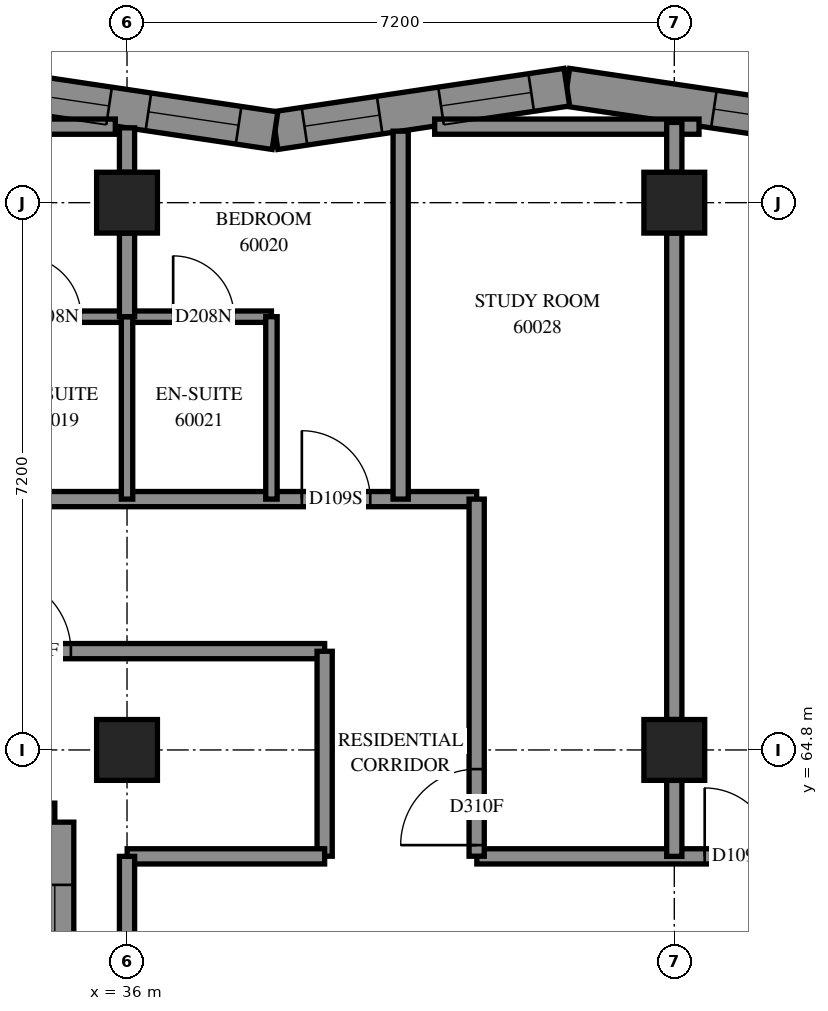
"""IFC4 building model, lengths in metres.
Left out: names, types, materials, properties, quantities, classifications, styles, units other than length and angle.
Written with IfcOpenShell. Run it as: python <this file> out.ifc"""

import sys

from ifc_helpers import new_model, si_unit, direction, frame, frame_2d, origin, origin_2d, place, context, subcontext, project, spatial, polyline, rectangle, outline, extrude, element, fill, save


model = new_model("IFC4")
c1 = context("Model", 3, precision=1e-05, world=origin(), true_north=direction((0.0, 1.0)))
c2 = subcontext(c1, "Body", "Model", "MODEL_VIEW")
j1 = project(units=[si_unit("LENGTHUNIT", "METRE"), si_unit("PLANEANGLEUNIT", "RADIAN")], contexts=[c1])
p1 = place(None, origin())
s1 = spatial("IfcSite", under=j1, at=p1, CompositionType="ELEMENT")
p2 = place(p1, origin())
s2 = spatial("IfcBuilding", under=s1, at=p2, CompositionType="ELEMENT")
p3 = place(p2, frame((0.0, 0.0, 220.2)))
s3 = spatial("IfcBuildingStorey", under=s2, at=p3, CompositionType="ELEMENT", Elevation=220.2)
for number, where, z_axis, x_axis in (
    (1, (36.0, 64.8, 0.0), (0.0, 0.0, 1.0), (1.0, 0.0, 0.0)),
    (2, (36.0, 72.0, 0.0), (0.0, 0.0, 1.0), (1.0, 0.0, 0.0)),
    (3, (43.2, 64.8, 0.0), (0.0, 0.0, 1.0), (1.0, 0.0, 0.0)),
    (4, (43.2, 72.0, 0.0), (0.0, 0.0, 1.0), (1.0, 0.0, 0.0)),
):
    element("IfcColumn", number, at=place(p3, frame(where, z_axis=z_axis, x_axis=x_axis)), inside=s3, PredefinedType="COLUMN", context=c2, shape_type="SweptSolid", body=[
        extrude(rectangle(XDim=0.8, YDim=0.8, at=origin_2d()), origin(), (0.0, 0.0, 1.0), 3.1),
    ])
p4 = place(p3, frame((45.626, 72.947, 0.0), z_axis=(0.0, 0.0, 1.0), x_axis=(-0.9890853061, 0.14734401, 0.0)))
e5 = element("IfcWall", 5, at=p4, inside=s3, PredefinedType="SOLIDWALL", context=c2, shape_type="SweptSolid", body=[
    extrude(outline(polyline([(0.037, -0.25), (3.919, -0.25), (3.845, 0.25), (-0.037, 0.25), (0.037, -0.25)])), origin(), (0.0, 0.0, 1.0), 3.1),
])
p5 = place(p4, frame((0.726, 0.0, 0.45)))
e6 = element("IfcOpeningElement", 6, at=p5, cuts=e5, PredefinedType="OPENING", context=c2, shape_type="SweptSolid", body=[
    extrude(rectangle(XDim=1.2, YDim=2.5, at=frame_2d((0.6, 1.25))), frame((0.0, 0.26, 0.0), z_axis=(0.0, -1.0, 0.0), x_axis=(1.0, 0.0, 0.0)), (0.0, 0.0, 1.0), 0.52),
])
p6 = place(p3, frame((41.786, 73.519, 0.0), z_axis=(0.0, 0.0, 1.0), x_axis=(-0.9890847468, -0.1473477641, 0.0)))
e7 = element("IfcWall", 7, at=p6, inside=s3, PredefinedType="SOLIDWALL", context=c2, shape_type="SweptSolid", body=[
    extrude(outline(polyline([(-0.037, -0.25), (3.845, -0.25), (3.919, 0.25), (0.037, 0.25), (-0.037, -0.25)])), origin(), (0.0, 0.0, 1.0), 3.1),
])
p7 = place(p6, frame((0.474, 0.0, 0.45)))
e8 = element("IfcOpeningElement", 8, at=p7, cuts=e7, PredefinedType="OPENING", context=c2, shape_type="SweptSolid", body=[
    extrude(rectangle(XDim=1.2, YDim=2.5, at=frame_2d((0.6, 1.25))), frame((0.0, 0.26, 0.0), z_axis=(0.0, -1.0, 0.0), x_axis=(1.0, 0.0, 0.0)), (0.0, 0.0, 1.0), 0.52),
])
p8 = place(p6, frame((2.49, 0.0, 0.45)))
e9 = element("IfcOpeningElement", 9, at=p8, cuts=e7, PredefinedType="OPENING", context=c2, shape_type="SweptSolid", body=[
    extrude(rectangle(XDim=1.0, YDim=2.5, at=frame_2d((0.5, 1.25))), frame((0.0, 0.26, 0.0), z_axis=(0.0, -1.0, 0.0), x_axis=(1.0, 0.0, 0.0)), (0.0, 0.0, 1.0), 0.52),
])
p9 = place(p3, frame((37.947, 72.947, 0.0), z_axis=(0.0, 0.0, 1.0), x_axis=(-0.9890847468, 0.1473477641, 0.0)))
e10 = element("IfcWall", 10, at=p9, inside=s3, PredefinedType="SOLIDWALL", context=c2, shape_type="SweptSolid", body=[
    extrude(outline(polyline([(0.037, -0.25), (3.919, -0.25), (3.845, 0.25), (-0.037, 0.25), (0.037, -0.25)])), origin(), (0.0, 0.0, 1.0), 3.1),
])
p10 = place(p9, frame((0.484, 0.0, 0.45)))
e11 = element("IfcOpeningElement", 11, at=p10, cuts=e10, PredefinedType="OPENING", context=c2, shape_type="SweptSolid", body=[
    extrude(rectangle(XDim=1.2, YDim=2.5, at=frame_2d((0.6, 1.25))), frame((0.0, 0.26, 0.0), z_axis=(0.0, -1.0, 0.0), x_axis=(1.0, 0.0, 0.0)), (0.0, 0.0, 1.0), 0.52),
])
p11 = place(p9, frame((2.207, 0.0, 0.45)))
e12 = element("IfcOpeningElement", 12, at=p11, cuts=e10, PredefinedType="OPENING", context=c2, shape_type="SweptSolid", body=[
    extrude(rectangle(XDim=1.2, YDim=2.5, at=frame_2d((0.6, 1.25))), frame((0.0, 0.26, 0.0), z_axis=(0.0, -1.0, 0.0), x_axis=(1.0, 0.0, 0.0)), (0.0, 0.0, 1.0), 0.52),
])
p12 = place(p3, frame((26.678, 63.85, 0.0), z_axis=(0.0, 0.0, 1.0), x_axis=(1.0, 0.0, 0.0)))
e13 = element("IfcWall", 13, at=p12, inside=s3, PredefinedType="SOLIDWALL", context=c2, shape_type="SweptSolid", body=[
    extrude(outline(polyline([(-0.25, -0.25), (8.122, -0.25), (8.622, 0.25), (0.25, 0.25), (-0.25, -0.25)])), origin(), (0.0, 0.0, 1.0), 3.1),
])
p13 = place(p12, frame((2.272, 0.0, 0.45)))
e14 = element("IfcOpeningElement", 14, at=p13, cuts=e13, PredefinedType="OPENING", context=c2, shape_type="SweptSolid", body=[
    extrude(rectangle(XDim=1.3, YDim=2.5, at=frame_2d((0.65, 1.25))), frame((0.0, 0.26, 0.0), z_axis=(0.0, -1.0, 0.0), x_axis=(1.0, 0.0, 0.0)), (0.0, 0.0, 1.0), 0.52),
])
p14 = place(p12, frame((3.772, 0.0, 0.45)))
e15 = element("IfcOpeningElement", 15, at=p14, cuts=e13, PredefinedType="OPENING", context=c2, shape_type="SweptSolid", body=[
    extrude(rectangle(XDim=1.3, YDim=2.5, at=frame_2d((0.65, 1.25))), frame((0.0, 0.26, 0.0), z_axis=(0.0, -1.0, 0.0), x_axis=(1.0, 0.0, 0.0)), (0.0, 0.0, 1.0), 0.52),
])
p15 = place(p12, frame((0.686, 0.0, 0.45)))
e16 = element("IfcOpeningElement", 16, at=p15, cuts=e13, PredefinedType="OPENING", context=c2, shape_type="SweptSolid", body=[
    extrude(rectangle(XDim=1.2, YDim=2.5, at=frame_2d((0.6, 1.25))), frame((0.0, 0.26, 0.0), z_axis=(0.0, -1.0, 0.0), x_axis=(1.0, 0.0, 0.0)), (0.0, 0.0, 1.0), 0.52),
])
p16 = place(p12, frame((6.347, 0.0, 0.45)))
e17 = element("IfcOpeningElement", 17, at=p16, cuts=e13, PredefinedType="OPENING", context=c2, shape_type="SweptSolid", body=[
    extrude(rectangle(XDim=1.2, YDim=2.5, at=frame_2d((0.6, 1.25))), frame((0.0, 0.26, 0.0), z_axis=(0.0, -1.0, 0.0), x_axis=(1.0, 0.0, 0.0)), (0.0, 0.0, 1.0), 0.52),
])
p17 = place(p3, frame((35.05, 63.85, 0.0), z_axis=(0.0, 0.0, 1.0), x_axis=(0.0, -1.0, 0.0)))
e18 = element("IfcWall", 18, at=p17, inside=s3, PredefinedType="SOLIDWALL", context=c2, shape_type="SweptSolid", body=[
    extrude(outline(polyline([(0.25, -0.25), (7.45, -0.25), (6.95, 0.25), (-0.25, 0.25), (0.25, -0.25)])), origin(), (0.0, 0.0, 1.0), 3.1),
])
p18 = place(p17, frame((3.05, 0.0, 0.45)))
e19 = element("IfcOpeningElement", 19, at=p18, cuts=e18, PredefinedType="OPENING", context=c2, shape_type="SweptSolid", body=[
    extrude(rectangle(XDim=1.3, YDim=2.5, at=frame_2d((0.65, 1.25))), frame((0.0, 0.26, 0.0), z_axis=(0.0, -1.0, 0.0), x_axis=(1.0, 0.0, 0.0)), (0.0, 0.0, 1.0), 0.52),
])
p19 = place(p17, frame((5.0, 0.0, 0.45)))
e20 = element("IfcOpeningElement", 20, at=p19, cuts=e18, PredefinedType="OPENING", context=c2, shape_type="SweptSolid", body=[
    extrude(rectangle(XDim=1.3, YDim=2.5, at=frame_2d((0.65, 1.25))), frame((0.0, 0.26, 0.0), z_axis=(0.0, -1.0, 0.0), x_axis=(1.0, 0.0, 0.0)), (0.0, 0.0, 1.0), 0.52),
])
p20 = place(p17, frame((0.825, 0.0, 0.45)))
e21 = element("IfcOpeningElement", 21, at=p20, cuts=e18, PredefinedType="OPENING", context=c2, shape_type="SweptSolid", body=[
    extrude(rectangle(XDim=1.2, YDim=2.5, at=frame_2d((0.6, 1.25))), frame((0.0, 0.26, 0.0), z_axis=(0.0, -1.0, 0.0), x_axis=(1.0, 0.0, 0.0)), (0.0, 0.0, 1.0), 0.52),
])
p21 = place(p3, frame((40.602, 63.4, 0.0), z_axis=(0.0, 0.0, 1.0), x_axis=(1.0, 0.0, 0.0)))
e22 = element("IfcWall", 22, at=p21, inside=s3, PredefinedType="PARTITIONING", context=c2, shape_type="SweptSolid", body=[
    extrude(rectangle(XDim=14.398, YDim=0.2, at=frame_2d((7.199, 0.0))), origin(), (0.0, 0.0, 1.0), 3.1),
])
p22 = place(p21, frame((2.998, 0.0, 0.0)))
e23 = element("IfcOpeningElement", 23, at=p22, cuts=e22, PredefinedType="OPENING", context=c2, shape_type="SweptSolid", body=[
    extrude(rectangle(XDim=0.9, YDim=2.1, at=frame_2d((0.45, 1.05))), frame((0.0, 0.11, 0.0), z_axis=(0.0, -1.0, 0.0), x_axis=(1.0, 0.0, 0.0)), (0.0, 0.0, 1.0), 0.22),
])
p23 = place(p21, frame((8.498, 0.0, 0.0)))
e24 = element("IfcOpeningElement", 24, at=p23, cuts=e22, PredefinedType="OPENING", context=c2, shape_type="SweptSolid", body=[
    extrude(rectangle(XDim=0.9, YDim=2.1, at=frame_2d((0.45, 1.05))), frame((0.0, 0.11, 0.0), z_axis=(0.0, -1.0, 0.0), x_axis=(1.0, 0.0, 0.0)), (0.0, 0.0, 1.0), 0.22),
])
p24 = place(p21, frame((10.198, 0.0, 0.0)))
e25 = element("IfcOpeningElement", 25, at=p24, cuts=e22, PredefinedType="OPENING", context=c2, shape_type="SweptSolid", body=[
    extrude(rectangle(XDim=0.9, YDim=2.1, at=frame_2d((0.45, 1.05))), frame((0.0, 0.11, 0.0), z_axis=(0.0, -1.0, 0.0), x_axis=(1.0, 0.0, 0.0)), (0.0, 0.0, 1.0), 0.22),
])
p25 = place(p3, frame((28.8, 68.1, 0.0), z_axis=(0.0, 0.0, 1.0), x_axis=(1.0, 0.0, 0.0)))
e26 = element("IfcWall", 26, at=p25, inside=s3, PredefinedType="PARTITIONING", context=c2, shape_type="SweptSolid", body=[
    extrude(rectangle(XDim=11.8, YDim=0.2, at=frame_2d((5.9, 0.0))), origin(), (0.0, 0.0, 1.0), 3.1),
])
p26 = place(p25, frame((2.3, 0.0, 0.0)))
e27 = element("IfcOpeningElement", 27, at=p26, cuts=e26, PredefinedType="OPENING", context=c2, shape_type="SweptSolid", body=[
    extrude(rectangle(XDim=0.9, YDim=2.1, at=frame_2d((0.45, 1.05))), frame((0.0, 0.11, 0.0), z_axis=(0.0, -1.0, 0.0), x_axis=(1.0, 0.0, 0.0)), (0.0, 0.0, 1.0), 0.22),
])
p27 = place(p25, frame((4.0, 0.0, 0.0)))
e28 = element("IfcOpeningElement", 28, at=p27, cuts=e26, PredefinedType="OPENING", context=c2, shape_type="SweptSolid", body=[
    extrude(rectangle(XDim=0.9, YDim=2.1, at=frame_2d((0.45, 1.05))), frame((0.0, 0.11, 0.0), z_axis=(0.0, -1.0, 0.0), x_axis=(1.0, 0.0, 0.0)), (0.0, 0.0, 1.0), 0.22),
])
p28 = place(p25, frame((9.5, 0.0, 0.0)))
e29 = element("IfcOpeningElement", 29, at=p28, cuts=e26, PredefinedType="OPENING", context=c2, shape_type="SweptSolid", body=[
    extrude(rectangle(XDim=0.9, YDim=2.1, at=frame_2d((0.45, 1.05))), frame((0.0, 0.11, 0.0), z_axis=(0.0, -1.0, 0.0), x_axis=(1.0, 0.0, 0.0)), (0.0, 0.0, 1.0), 0.22),
])
p29 = place(p3, frame((28.802, 66.1, 0.0), z_axis=(0.0, 0.0, 1.0), x_axis=(1.0, 0.0, 0.0)))
e30 = element("IfcWall", 30, at=p29, inside=s3, PredefinedType="PARTITIONING", context=c2, shape_type="SweptSolid", body=[
    extrude(rectangle(XDim=9.798, YDim=0.2, at=frame_2d((4.899, 0.0))), origin(), (0.0, 0.0, 1.0), 3.1),
])
p30 = place(p29, frame((0.449, 0.0, 0.0)))
e31 = element("IfcOpeningElement", 31, at=p30, cuts=e30, PredefinedType="OPENING", context=c2, shape_type="SweptSolid", body=[
    extrude(rectangle(XDim=1.0, YDim=2.1, at=frame_2d((0.5, 1.05))), frame((0.0, 0.11, 0.0), z_axis=(0.0, -1.0, 0.0), x_axis=(1.0, 0.0, 0.0)), (0.0, 0.0, 1.0), 0.22),
])
p31 = place(p29, frame((5.459, 0.0, 0.0)))
e32 = element("IfcOpeningElement", 32, at=p31, cuts=e30, PredefinedType="OPENING", context=c2, shape_type="SweptSolid", body=[
    extrude(rectangle(XDim=1.0, YDim=2.1, at=frame_2d((0.5, 1.05))), frame((0.0, 0.11, 0.0), z_axis=(0.0, -1.0, 0.0), x_axis=(1.0, 0.0, 0.0)), (0.0, 0.0, 1.0), 0.22),
])
p32 = place(p3, frame((43.2, 65.2, 0.0), z_axis=(0.0, 0.0, 1.0), x_axis=(0.0, 1.0, 0.0)))
e33 = element("IfcWall", 33, at=p32, inside=s3, PredefinedType="PARTITIONING", context=c2, shape_type="SweptSolid", body=[
    extrude(rectangle(XDim=6.4, YDim=0.2, at=frame_2d((3.2, 0.0))), origin(), (0.0, 0.0, 1.0), 3.1),
])
p33 = place(p3, frame((39.6, 68.1, 0.0), z_axis=(0.0, 0.0, 1.0), x_axis=(0.0, 1.0, 0.0)))
e34 = element("IfcWall", 34, at=p33, inside=s3, PredefinedType="PARTITIONING", context=c2, shape_type="SweptSolid", body=[
    extrude(rectangle(XDim=4.841, YDim=0.2, at=frame_2d((2.42, 0.0))), origin(), (0.0, 0.0, 1.0), 3.1),
])
p34 = place(p3, frame((40.6, 63.402, 0.0), z_axis=(0.0, 0.0, 1.0), x_axis=(0.0, 1.0, 0.0)))
e35 = element("IfcWall", 35, at=p34, inside=s3, PredefinedType="PARTITIONING", context=c2, shape_type="SweptSolid", body=[
    extrude(rectangle(XDim=4.698, YDim=0.2, at=frame_2d((2.349, 0.0))), origin(), (0.0, 0.0, 1.0), 3.1),
])
p35 = place(p34, frame((0.146, 0.0, 0.0)))
e36 = element("IfcOpeningElement", 36, at=p35, cuts=e35, PredefinedType="OPENING", context=c2, shape_type="SweptSolid", body=[
    extrude(rectangle(XDim=1.0, YDim=2.1, at=frame_2d((0.5, 1.05))), frame((0.0, 0.11, 0.0), z_axis=(0.0, -1.0, 0.0), x_axis=(1.0, 0.0, 0.0)), (0.0, 0.0, 1.0), 0.22),
])
p36 = place(p3, frame((34.1, 70.5, 0.0), z_axis=(0.0, 0.0, 1.0), x_axis=(1.0, 0.0, 0.0)))
e37 = element("IfcWall", 37, at=p36, inside=s3, PredefinedType="PARTITIONING", context=c2, shape_type="SweptSolid", body=[
    extrude(rectangle(XDim=3.8, YDim=0.15, at=frame_2d((1.9, 0.0))), origin(), (0.0, 0.0, 1.0), 3.1),
])
p37 = place(p36, frame((0.493, 0.0, 0.0)))
e38 = element("IfcOpeningElement", 38, at=p37, cuts=e37, PredefinedType="OPENING", context=c2, shape_type="SweptSolid", body=[
    extrude(rectangle(XDim=0.8, YDim=2.1, at=frame_2d((0.4, 1.05))), frame((0.0, 0.085, 0.0), z_axis=(0.0, -1.0, 0.0), x_axis=(1.0, 0.0, 0.0)), (0.0, 0.0, 1.0), 0.17),
])
p38 = place(p36, frame((2.507, 0.0, 0.0)))
e39 = element("IfcOpeningElement", 39, at=p38, cuts=e37, PredefinedType="OPENING", context=c2, shape_type="SweptSolid", body=[
    extrude(rectangle(XDim=0.8, YDim=2.1, at=frame_2d((0.4, 1.05))), frame((0.0, 0.085, 0.0), z_axis=(0.0, -1.0, 0.0), x_axis=(1.0, 0.0, 0.0)), (0.0, 0.0, 1.0), 0.17),
])
p39 = place(p3, frame((40.048, 73.0, 0.0), z_axis=(0.0, 0.0, 1.0), x_axis=(1.0, 0.0, 0.0)))
e40 = element("IfcWall", 40, at=p39, inside=s3, PredefinedType="PARTITIONING", context=c2, shape_type="SweptSolid", body=[
    extrude(rectangle(XDim=3.478, YDim=0.2, at=frame_2d((1.739, 0.0))), origin(), (0.0, 0.0, 1.0), 3.1),
])
p40 = place(p3, frame((32.368, 73.0, 0.0), z_axis=(0.0, 0.0, 1.0), x_axis=(1.0, 0.0, 0.0)))
e41 = element("IfcWall", 41, at=p40, inside=s3, PredefinedType="PARTITIONING", context=c2, shape_type="SweptSolid", body=[
    extrude(rectangle(XDim=3.478, YDim=0.2, at=frame_2d((1.739, 0.0))), origin(), (0.0, 0.0, 1.0), 3.1),
])
p41 = place(p3, frame((38.6, 63.402, 0.0), z_axis=(0.0, 0.0, 1.0), x_axis=(0.0, 1.0, 0.0)))
e42 = element("IfcWall", 42, at=p41, inside=s3, PredefinedType="PARTITIONING", context=c2, shape_type="SweptSolid", body=[
    extrude(rectangle(XDim=2.696, YDim=0.2, at=frame_2d((1.348, 0.0))), origin(), (0.0, 0.0, 1.0), 3.1),
])
p42 = place(p3, frame((36.002, 63.4, 0.0), z_axis=(0.0, 0.0, 1.0), x_axis=(1.0, 0.0, 0.0)))
e43 = element("IfcWall", 43, at=p42, inside=s3, PredefinedType="PARTITIONING", context=c2, shape_type="SweptSolid", body=[
    extrude(rectangle(XDim=2.598, YDim=0.2, at=frame_2d((1.299, 0.0))), origin(), (0.0, 0.0, 1.0), 3.1),
])
for number, where, z_axis, x_axis in (
    (44, (37.9, 68.1, 0.0), (0.0, 0.0, 1.0), (0.0, 1.0, 0.0)),
    (45, (36.0, 68.1, 0.0), (0.0, 0.0, 1.0), (0.0, 1.0, 0.0)),
):
    element("IfcWall", number, at=place(p3, frame(where, z_axis=z_axis, x_axis=x_axis)), inside=s3, PredefinedType="PARTITIONING", context=c2, shape_type="SweptSolid", body=[
        extrude(rectangle(XDim=2.4, YDim=0.15, at=frame_2d((1.2, 0.0))), origin(), (0.0, 0.0, 1.0), 3.1),
    ])
p43 = place(p3, frame((36.0, 61.4, 0.0), z_axis=(0.0, 0.0, 1.0), x_axis=(0.0, 1.0, 0.0)))
e46 = element("IfcWall", 46, at=p43, inside=s3, PredefinedType="PARTITIONING", context=c2, shape_type="SweptSolid", body=[
    extrude(rectangle(XDim=2.0, YDim=0.2, at=frame_2d((1.0, 0.0))), origin(), (0.0, 0.0, 1.0), 2.6),
])
p44 = place(p3, frame((36.0, 70.5, 0.0), z_axis=(0.0, 0.0, 1.0), x_axis=(0.0, 1.0, 0.0)))
e47 = element("IfcWall", 47, at=p44, inside=s3, PredefinedType="PARTITIONING", context=c2, shape_type="SweptSolid", body=[
    extrude(rectangle(XDim=1.1, YDim=0.2, at=frame_2d((0.55, 0.0))), origin(), (0.0, 0.0, 1.0), 3.1),
])
p45 = place(p3, frame((43.2, 63.4, 0.0), z_axis=(0.0, 0.0, 1.0), x_axis=(0.0, 1.0, 0.0)))
e48 = element("IfcWall", 48, at=p45, inside=s3, PredefinedType="PARTITIONING", context=c2, shape_type="SweptSolid", body=[
    extrude(rectangle(XDim=1.0, YDim=0.2, at=frame_2d((0.5, 0.0))), origin(), (0.0, 0.0, 1.0), 3.1),
])
p46 = place(p3, frame((43.2, 72.4, 0.0), z_axis=(0.0, 0.0, 1.0), x_axis=(0.0, 1.0, 0.0)))
e49 = element("IfcWall", 49, at=p46, inside=s3, PredefinedType="PARTITIONING", context=c2, shape_type="SweptSolid", body=[
    extrude(rectangle(XDim=0.656, YDim=0.2, at=frame_2d((0.328, 0.0))), origin(), (0.0, 0.0, 1.0), 3.1),
])
p47 = place(p3, frame((36.0, 72.4, 0.0), z_axis=(0.0, 0.0, 1.0), x_axis=(0.0, 1.0, 0.0)))
e50 = element("IfcWall", 50, at=p47, inside=s3, PredefinedType="PARTITIONING", context=c2, shape_type="SweptSolid", body=[
    extrude(rectangle(XDim=0.585, YDim=0.2, at=frame_2d((0.292, 0.0))), origin(), (0.0, 0.0, 1.0), 3.1),
])
p48 = place(p5, origin())
e51 = element("IfcWindow", 51, at=p48, inside=s3, PartitioningType="SINGLE_PANEL", PredefinedType="WINDOW", context=c2, shape_type="SweptSolid", body=[
    extrude(rectangle(XDim=1.2, YDim=2.5, at=frame_2d((0.6, 1.25))), frame((0.0, 0.18, 0.0), z_axis=(0.0, -1.0, 0.0), x_axis=(1.0, 0.0, 0.0)), (0.0, 0.0, 1.0), 0.06),
])
fill(e6, e51)
p49 = place(p7, origin())
e52 = element("IfcWindow", 52, at=p49, inside=s3, PartitioningType="SINGLE_PANEL", PredefinedType="WINDOW", context=c2, shape_type="SweptSolid", body=[
    extrude(rectangle(XDim=1.2, YDim=2.5, at=frame_2d((0.6, 1.25))), frame((0.0, 0.14, 0.0), z_axis=(0.0, -1.0, 0.0), x_axis=(1.0, 0.0, 0.0)), (0.0, 0.0, 1.0), 0.06),
])
fill(e8, e52)
p50 = place(p10, origin())
e53 = element("IfcWindow", 53, at=p50, inside=s3, PartitioningType="SINGLE_PANEL", PredefinedType="WINDOW", context=c2, shape_type="SweptSolid", body=[
    extrude(rectangle(XDim=1.2, YDim=2.5, at=frame_2d((0.6, 1.25))), frame((0.0, 0.18, 0.0), z_axis=(0.0, -1.0, 0.0), x_axis=(1.0, 0.0, 0.0)), (0.0, 0.0, 1.0), 0.06),
])
fill(e11, e53)
p51 = place(p11, origin())
e54 = element("IfcWindow", 54, at=p51, inside=s3, PartitioningType="SINGLE_PANEL", PredefinedType="WINDOW", context=c2, shape_type="SweptSolid", body=[
    extrude(rectangle(XDim=1.2, YDim=2.5, at=frame_2d((0.6, 1.25))), frame((0.0, 0.14, 0.0), z_axis=(0.0, -1.0, 0.0), x_axis=(1.0, 0.0, 0.0)), (0.0, 0.0, 1.0), 0.06),
])
fill(e12, e54)
p52 = place(p20, origin())
e55 = element("IfcWindow", 55, at=p52, inside=s3, PartitioningType="SINGLE_PANEL", PredefinedType="WINDOW", context=c2, shape_type="SweptSolid", body=[
    extrude(rectangle(XDim=1.2, YDim=2.5, at=frame_2d((0.6, 1.25))), frame((0.0, 0.18, 0.0), z_axis=(0.0, -1.0, 0.0), x_axis=(1.0, 0.0, 0.0)), (0.0, 0.0, 1.0), 0.06),
])
fill(e21, e55)
p53 = place(p37, origin())
e56 = element("IfcDoor", 56, at=p53, inside=s3, OperationType="SINGLE_SWING_RIGHT", PredefinedType="DOOR", context=c2, shape_type="SweptSolid", body=[
    extrude(rectangle(XDim=0.8, YDim=2.1, at=frame_2d((0.4, 1.05))), frame((0.0, 0.025, 0.0), z_axis=(0.0, -1.0, 0.0), x_axis=(1.0, 0.0, 0.0)), (0.0, 0.0, 1.0), 0.05),
])
fill(e38, e56)
p54 = place(p28, origin())
e57 = element("IfcDoor", 57, at=p54, inside=s3, OperationType="SINGLE_SWING_RIGHT", PredefinedType="DOOR", context=c2, shape_type="SweptSolid", body=[
    extrude(rectangle(XDim=0.9, YDim=2.1, at=frame_2d((0.45, 1.05))), frame((0.0, 0.025, 0.0), z_axis=(0.0, -1.0, 0.0), x_axis=(1.0, 0.0, 0.0)), (0.0, 0.0, 1.0), 0.05),
])
fill(e29, e57)
p55 = place(p38, origin())
e58 = element("IfcDoor", 58, at=p55, inside=s3, OperationType="SINGLE_SWING_RIGHT", PredefinedType="DOOR", context=c2, shape_type="SweptSolid", body=[
    extrude(rectangle(XDim=0.8, YDim=2.1, at=frame_2d((0.4, 1.05))), frame((0.0, 0.025, 0.0), z_axis=(0.0, -1.0, 0.0), x_axis=(1.0, 0.0, 0.0)), (0.0, 0.0, 1.0), 0.05),
])
fill(e39, e58)
p56 = place(p31, origin())
e59 = element("IfcDoor", 59, at=p56, inside=s3, OperationType="SINGLE_SWING_RIGHT", PredefinedType="DOOR", context=c2, shape_type="SweptSolid", body=[
    extrude(rectangle(XDim=1.0, YDim=2.1, at=frame_2d((0.5, 1.05))), frame((0.0, 0.025, 0.0), z_axis=(0.0, -1.0, 0.0), x_axis=(1.0, 0.0, 0.0)), (0.0, 0.0, 1.0), 0.05),
])
fill(e32, e59)
p57 = place(p35, origin())
e60 = element("IfcDoor", 60, at=p57, inside=s3, OperationType="SINGLE_SWING_LEFT", PredefinedType="DOOR", context=c2, shape_type="SweptSolid", body=[
    extrude(rectangle(XDim=1.0, YDim=2.1, at=frame_2d((0.5, 1.05))), frame((0.0, 0.025, 0.0), z_axis=(0.0, -1.0, 0.0), x_axis=(1.0, 0.0, 0.0)), (0.0, 0.0, 1.0), 0.05),
])
fill(e36, e60)
p58 = place(p22, origin())
e61 = element("IfcDoor", 61, at=p58, inside=s3, OperationType="SINGLE_SWING_RIGHT", PredefinedType="DOOR", context=c2, shape_type="SweptSolid", body=[
    extrude(rectangle(XDim=0.9, YDim=2.1, at=frame_2d((0.45, 1.05))), frame((0.0, 0.025, 0.0), z_axis=(0.0, -1.0, 0.0), x_axis=(1.0, 0.0, 0.0)), (0.0, 0.0, 1.0), 0.05),
])
fill(e23, e61)
p59 = place(p8, origin())
e62 = element("IfcWindow", 62, at=p59, inside=s3, PartitioningType="SINGLE_PANEL", PredefinedType="WINDOW", context=c2, shape_type="SweptSolid", body=[
    extrude(rectangle(XDim=1.0, YDim=2.5, at=frame_2d((0.5, 1.25))), frame((0.0, 0.18, 0.0), z_axis=(0.0, -1.0, 0.0), x_axis=(1.0, 0.0, 0.0)), (0.0, 0.0, 1.0), 0.06),
])
fill(e9, e62)
save(model, sys.argv[1])
